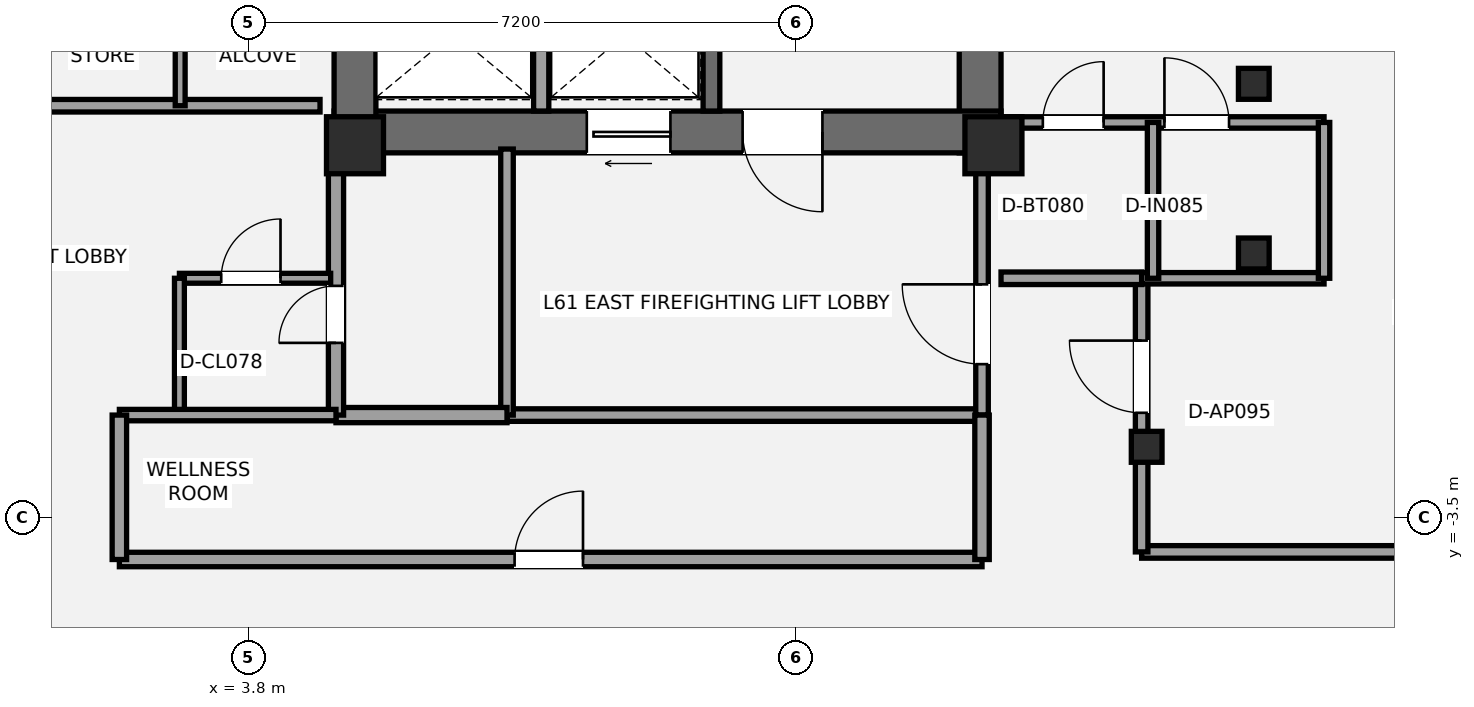
"""IFC4 building model, lengths in metres.
Left out: names, types, materials, properties, quantities, classifications, styles, units other than length and angle.
Written with IfcOpenShell. Run it as: python <this file> out.ifc"""

import sys

from ifc_helpers import new_model, si_unit, direction, frame, frame_2d, origin, origin_2d, place, context, subcontext, project, spatial, rectangle, i_section, extrude, element, fill, save


model = new_model("IFC4")
c1 = context("Model", 3, precision=1e-05, world=origin(), true_north=direction((0.0, 1.0)))
c2 = subcontext(c1, "Body", "Model", "MODEL_VIEW")
j1 = project(units=[si_unit("LENGTHUNIT", "METRE"), si_unit("PLANEANGLEUNIT", "RADIAN")], contexts=[c1])
p1 = place(None, origin())
s1 = spatial("IfcSite", under=j1, at=p1, CompositionType="ELEMENT")
p2 = place(p1, origin())
s2 = spatial("IfcBuilding", under=s1, at=p2, CompositionType="ELEMENT")
p3 = place(p2, frame((0.0, 0.0, 219.45)))
s3 = spatial("IfcBuildingStorey", under=s2, at=p3, CompositionType="ELEMENT", Elevation=219.45)
p4 = place(p3, frame((13.425, 1.3, 0.0), z_axis=(0.0, 0.0, 1.0), x_axis=(0.0, 1.0, 0.0)))
e1 = element("IfcWall", 1, at=p4, inside=s3, PredefinedType="SHEAR", context=c2, shape_type="SweptSolid", body=[
    extrude(rectangle(XDim=8.25, YDim=0.55, at=frame_2d((4.125, 0.0))), origin(), (0.0, 0.0, 1.0), 3.15),
])
p5 = place(p3, frame((13.7, 1.575, 0.0), z_axis=(0.0, 0.0, 1.0), x_axis=(-1.0, 0.0, 0.0)))
e2 = element("IfcWall", 2, at=p5, inside=s3, PredefinedType="SHEAR", context=c2, shape_type="SweptSolid", body=[
    extrude(rectangle(XDim=8.775, YDim=0.55, at=frame_2d((4.387, 0.0))), origin(), (0.0, 0.0, 1.0), 3.15),
])
p6 = place(p5, frame((2.35, 0.0, 0.0)))
e3 = element("IfcOpeningElement", 3, at=p6, cuts=e2, PredefinedType="OPENING", context=c2, shape_type="SweptSolid", body=[
    extrude(rectangle(XDim=1.05, YDim=2.15, at=frame_2d((0.525, 1.075))), frame((0.0, 0.285, 0.0), z_axis=(0.0, -1.0, 0.0), x_axis=(1.0, 0.0, 0.0)), (0.0, 0.0, 1.0), 0.57),
])
p7 = place(p5, frame((4.35, 0.0, 0.0)))
e4 = element("IfcOpeningElement", 4, at=p7, cuts=e2, PredefinedType="OPENING", context=c2, shape_type="SweptSolid", body=[
    extrude(rectangle(XDim=1.1, YDim=2.2, at=frame_2d((0.55, 1.1))), frame((0.0, 0.285, 0.0), z_axis=(0.0, -1.0, 0.0), x_axis=(1.0, 0.0, 0.0)), (0.0, 0.0, 1.0), 0.57),
])
p8 = place(p3, frame((5.2, 1.3, 0.0), z_axis=(0.0, 0.0, 1.0), x_axis=(0.0, 1.0, 0.0)))
e5 = element("IfcWall", 5, at=p8, inside=s3, PredefinedType="SHEAR", context=c2, shape_type="SweptSolid", body=[
    extrude(rectangle(XDim=2.5, YDim=0.55, at=frame_2d((1.25, 0.0))), origin(), (0.0, 0.0, 1.0), 3.15),
])
p9 = place(p3, frame((9.89, 1.85, 0.0), z_axis=(0.0, 0.0, 1.0), x_axis=(0.0, 1.0, 0.0)))
e6 = element("IfcWall", 6, at=p9, inside=s3, PredefinedType="SHEAR", context=c2, shape_type="SweptSolid", body=[
    extrude(rectangle(XDim=7.15, YDim=0.22, at=frame_2d((3.575, 0.0))), origin(), (0.0, 0.0, 1.0), 3.15),
])
for number, where, z_axis, x_axis in (
    (7, (5.2, 1.4, 0.0), (0.0, 0.0, 1.0), (1.0, 0.0, 0.0)),
    (8, (13.6, 1.4, 0.0), (0.0, 0.0, 1.0), (1.0, 0.0, 0.0)),
):
    element("IfcColumn", number, at=place(p3, frame(where, z_axis=z_axis, x_axis=x_axis)), inside=s3, PredefinedType="PILASTER", context=c2, shape_type="SweptSolid", body=[
        extrude(rectangle(XDim=0.75, YDim=0.75, at=origin_2d()), origin(), (0.0, 0.0, 1.0), 3.15),
    ])
for number, where, z_axis, x_axis in (
    (9, (17.026, 2.208, 0.0), (0.0, 0.0, 1.0), (1.0, 0.0, 0.0)),
    (10, (15.616, -2.567, 0.0), (0.0, 0.0, 1.0), (1.0, 0.0, 0.0)),
    (11, (17.026, -0.024, 0.0), (0.0, 0.0, 1.0), (1.0, 0.0, 0.0)),
):
    element("IfcColumn", number, at=place(p3, frame(where, z_axis=z_axis, x_axis=x_axis)), inside=s3, PredefinedType="COLUMN", context=c2, shape_type="SweptSolid", body=[
        extrude(i_section(OverallWidth=0.404, OverallDepth=0.407, WebThickness=0.027, FlangeThickness=0.044, at=origin_2d()), origin(), (0.0, 0.0, 1.0), 3.15),
    ])
p10 = place(p3, frame((7.2, -2.15, 0.0), z_axis=(0.0, 0.0, 1.0), x_axis=(1.0, 0.0, 0.0)))
e12 = element("IfcWall", 12, at=p10, inside=s3, PredefinedType="PARTITIONING", context=c2, shape_type="SweptSolid", body=[
    extrude(rectangle(XDim=6.25, YDim=0.165, at=frame_2d((3.125, 0.0))), origin(), (0.0, 0.0, 1.0), 2.97),
])
p11 = place(p3, frame((7.2, -2.15, 0.0), z_axis=(0.0, 0.0, 1.0), x_axis=(0.0, 1.0, 0.0)))
e13 = element("IfcWall", 13, at=p11, inside=s3, PredefinedType="PARTITIONING", context=c2, shape_type="SweptSolid", body=[
    extrude(rectangle(XDim=3.5, YDim=0.165, at=frame_2d((1.75, 0.0))), origin(), (0.0, 0.0, 1.0), 2.423),
])
p12 = place(p3, frame((13.45, -2.15, 0.0), z_axis=(0.0, 0.0, 1.0), x_axis=(0.0, 1.0, 0.0)))
e14 = element("IfcWall", 14, at=p12, inside=s3, PredefinedType="PARTITIONING", context=c2, shape_type="SweptSolid", body=[
    extrude(rectangle(XDim=3.5, YDim=0.165, at=frame_2d((1.75, 0.0))), origin(), (0.0, 0.0, 1.0), 2.423),
])
p13 = place(p12, frame((0.67, 0.0, 0.0)))
e15 = element("IfcOpeningElement", 15, at=p13, cuts=e14, PredefinedType="OPENING", context=c2, shape_type="SweptSolid", body=[
    extrude(rectangle(XDim=1.05, YDim=2.15, at=frame_2d((0.525, 1.075))), frame((0.0, 0.093, 0.0), z_axis=(0.0, -1.0, 0.0), x_axis=(1.0, 0.0, 0.0)), (0.0, 0.0, 1.0), 0.185),
])
p14 = place(p3, frame((4.95, -2.15, 0.0), z_axis=(0.0, 0.0, 1.0), x_axis=(1.0, 0.0, 0.0)))
e16 = element("IfcWall", 16, at=p14, inside=s3, PredefinedType="SOLIDWALL", context=c2, shape_type="SweptSolid", body=[
    extrude(rectangle(XDim=2.25, YDim=0.2, at=frame_2d((1.125, 0.0))), origin(), (0.0, 0.0, 1.0), 2.97),
])
p15 = place(p3, frame((4.95, -2.15, 0.0), z_axis=(0.0, 0.0, 1.0), x_axis=(0.0, 1.0, 0.0)))
e17 = element("IfcWall", 17, at=p15, inside=s3, PredefinedType="SOLIDWALL", context=c2, shape_type="SweptSolid", body=[
    extrude(rectangle(XDim=3.5, YDim=0.2, at=frame_2d((1.75, 0.0))), origin(), (0.0, 0.0, 1.0), 2.423),
])
p16 = place(p15, frame((0.95, 0.0, 0.0)))
e18 = element("IfcOpeningElement", 18, at=p16, cuts=e17, PredefinedType="OPENING", context=c2, shape_type="SweptSolid", body=[
    extrude(rectangle(XDim=0.75, YDim=2.1, at=frame_2d((0.375, 1.05))), frame((0.0, 0.11, 0.0), z_axis=(0.0, -1.0, 0.0), x_axis=(1.0, 0.0, 0.0)), (0.0, 0.0, 1.0), 0.22),
])
p17 = place(p3, frame((2.89, -0.35, 0.0), z_axis=(0.0, 0.0, 1.0), x_axis=(1.0, 0.0, 0.0)))
e19 = element("IfcWall", 19, at=p17, inside=s3, PredefinedType="PARTITIONING", context=c2, shape_type="SweptSolid", body=[
    extrude(rectangle(XDim=1.99, YDim=0.13, at=frame_2d((0.995, 0.0))), origin(), (0.0, 0.0, 1.0), 2.97),
])
p18 = place(p17, frame((0.55, 0.0, 0.0)))
e20 = element("IfcOpeningElement", 20, at=p18, cuts=e19, PredefinedType="OPENING", context=c2, shape_type="SweptSolid", body=[
    extrude(rectangle(XDim=0.78, YDim=2.1, at=frame_2d((0.39, 1.05))), frame((0.0, 0.075, 0.0), z_axis=(0.0, -1.0, 0.0), x_axis=(1.0, 0.0, 0.0)), (0.0, 0.0, 1.0), 0.15),
])
p19 = place(p3, frame((2.89, -2.15, 0.0), z_axis=(0.0, 0.0, 1.0), x_axis=(0.0, 1.0, 0.0)))
e21 = element("IfcWall", 21, at=p19, inside=s3, PredefinedType="PARTITIONING", context=c2, shape_type="SweptSolid", body=[
    extrude(rectangle(XDim=1.8, YDim=0.13, at=frame_2d((0.9, 0.0))), origin(), (0.0, 0.0, 1.0), 2.97),
])
p20 = place(p3, frame((7.65, 1.85, 0.0), z_axis=(0.0, 0.0, 1.0), x_axis=(0.0, 1.0, 0.0)))
e22 = element("IfcWall", 22, at=p20, inside=s3, PredefinedType="SOLIDWALL", context=c2, shape_type="SweptSolid", body=[
    extrude(rectangle(XDim=1.97, YDim=0.2, at=frame_2d((0.985, 0.0))), origin(), (0.0, 0.0, 1.0), 2.97),
])
p21 = place(p3, frame((0.85, 1.92, 0.0), z_axis=(0.0, 0.0, 1.0), x_axis=(1.0, 0.0, 0.0)))
e23 = element("IfcWall", 23, at=p21, inside=s3, PredefinedType="PARTITIONING", context=c2, shape_type="SweptSolid", body=[
    extrude(rectangle(XDim=3.89, YDim=0.165, at=frame_2d((1.945, 0.0))), origin(), (0.0, 0.0, 1.0), 2.11),
])
p22 = place(p3, frame((2.9, 1.92, 0.0), z_axis=(0.0, 0.0, 1.0), x_axis=(0.0, 1.0, 0.0)))
e24 = element("IfcWall", 24, at=p22, inside=s3, PredefinedType="PARTITIONING", context=c2, shape_type="SweptSolid", body=[
    extrude(rectangle(XDim=1.82, YDim=0.13, at=frame_2d((0.91, 0.0))), origin(), (0.0, 0.0, 1.0), 2.97),
])
p23 = place(p3, frame((2.1, -4.05, 0.0), z_axis=(0.0, 0.0, 1.0), x_axis=(1.0, 0.0, 0.0)))
e25 = element("IfcWall", 25, at=p23, inside=s3, PredefinedType="PLUMBINGWALL", context=c2, shape_type="SweptSolid", body=[
    extrude(rectangle(XDim=11.35, YDim=0.19, at=frame_2d((5.675, 0.0))), origin(), (0.0, 0.0, 1.0), 2.357),
])
p24 = place(p23, frame((5.2, 0.0, 0.0)))
e26 = element("IfcOpeningElement", 26, at=p24, cuts=e25, PredefinedType="OPENING", context=c2, shape_type="SweptSolid", body=[
    extrude(rectangle(XDim=0.9, YDim=2.1, at=frame_2d((0.45, 1.05))), frame((0.0, 0.105, 0.0), z_axis=(0.0, -1.0, 0.0), x_axis=(1.0, 0.0, 0.0)), (0.0, 0.0, 1.0), 0.21),
])
p25 = place(p3, frame((2.1, -2.15, 0.0), z_axis=(0.0, 0.0, 1.0), x_axis=(1.0, 0.0, 0.0)))
e27 = element("IfcWall", 27, at=p25, inside=s3, PredefinedType="PLUMBINGWALL", context=c2, shape_type="SweptSolid", body=[
    extrude(rectangle(XDim=2.85, YDim=0.15, at=frame_2d((1.425, 0.0))), origin(), (0.0, 0.0, 1.0), 2.97),
])
p26 = place(p3, frame((2.1, -4.05, 0.0), z_axis=(0.0, 0.0, 1.0), x_axis=(0.0, 1.0, 0.0)))
e28 = element("IfcWall", 28, at=p26, inside=s3, PredefinedType="PLUMBINGWALL", context=c2, shape_type="SweptSolid", body=[
    extrude(rectangle(XDim=1.9, YDim=0.19, at=frame_2d((0.95, 0.0))), origin(), (0.0, 0.0, 1.0), 2.97),
])
p27 = place(p3, frame((13.45, -4.05, 0.0), z_axis=(0.0, 0.0, 1.0), x_axis=(0.0, 1.0, 0.0)))
e29 = element("IfcWall", 29, at=p27, inside=s3, PredefinedType="PLUMBINGWALL", context=c2, shape_type="SweptSolid", body=[
    extrude(rectangle(XDim=1.9, YDim=0.19, at=frame_2d((0.95, 0.0))), origin(), (0.0, 0.0, 1.0), 2.423),
])
p28 = place(p3, frame((15.55, -3.95, 0.0), z_axis=(0.0, 0.0, 1.0), x_axis=(1.0, 0.0, 0.0)))
e30 = element("IfcWall", 30, at=p28, inside=s3, PredefinedType="PARTITIONING", context=c2, shape_type="SweptSolid", body=[
    extrude(rectangle(XDim=6.166, YDim=0.165, at=frame_2d((3.083, 0.0))), origin(), (0.0, 0.0, 1.0), 2.423),
])
p29 = place(p3, frame((15.55, -3.95, 0.0), z_axis=(0.0, 0.0, 1.0), x_axis=(0.0, 1.0, 0.0)))
e31 = element("IfcWall", 31, at=p29, inside=s3, PredefinedType="PARTITIONING", context=c2, shape_type="SweptSolid", body=[
    extrude(rectangle(XDim=3.6, YDim=0.165, at=frame_2d((1.8, 0.0))), origin(), (0.0, 0.0, 1.0), 2.357),
])
p30 = place(p29, frame((1.83, 0.0, 0.0)))
e32 = element("IfcOpeningElement", 32, at=p30, cuts=e31, PredefinedType="OPENING", context=c2, shape_type="SweptSolid", body=[
    extrude(rectangle(XDim=0.95, YDim=2.15, at=frame_2d((0.475, 1.075))), frame((0.0, 0.093, 0.0), z_axis=(0.0, -1.0, 0.0), x_axis=(1.0, 0.0, 0.0)), (0.0, 0.0, 1.0), 0.185),
])
p31 = place(p3, frame((13.7, -0.35, 0.0), z_axis=(0.0, 0.0, 1.0), x_axis=(1.0, 0.0, 0.0)))
e33 = element("IfcWall", 33, at=p31, inside=s3, PredefinedType="PARTITIONING", context=c2, shape_type="SweptSolid", body=[
    extrude(rectangle(XDim=1.85, YDim=0.165, at=frame_2d((0.925, 0.0))), origin(), (0.0, 0.0, 1.0), 2.423),
])
p32 = place(p3, frame((13.7, 1.7, 0.0), z_axis=(0.0, 0.0, 1.0), x_axis=(1.0, 0.0, 0.0)))
e34 = element("IfcWall", 34, at=p32, inside=s3, PredefinedType="PLUMBINGWALL", context=c2, shape_type="SweptSolid", body=[
    extrude(rectangle(XDim=4.25, YDim=0.15, at=frame_2d((2.125, 0.0))), origin(), (0.0, 0.0, 1.0), 2.423),
])
p33 = place(p32, frame((0.55, 0.0, 0.0)))
e35 = element("IfcOpeningElement", 35, at=p33, cuts=e34, PredefinedType="OPENING", context=c2, shape_type="SweptSolid", body=[
    extrude(rectangle(XDim=0.8, YDim=2.1, at=frame_2d((0.4, 1.05))), frame((0.0, 0.085, 0.0), z_axis=(0.0, -1.0, 0.0), x_axis=(1.0, 0.0, 0.0)), (0.0, 0.0, 1.0), 0.17),
])
p34 = place(p32, frame((2.15, 0.0, 0.0)))
e36 = element("IfcOpeningElement", 36, at=p34, cuts=e34, PredefinedType="OPENING", context=c2, shape_type="SweptSolid", body=[
    extrude(rectangle(XDim=0.85, YDim=2.1, at=frame_2d((0.425, 1.05))), frame((0.0, 0.085, 0.0), z_axis=(0.0, -1.0, 0.0), x_axis=(1.0, 0.0, 0.0)), (0.0, 0.0, 1.0), 0.17),
])
p35 = place(p3, frame((15.55, -0.35, 0.0), z_axis=(0.0, 0.0, 1.0), x_axis=(1.0, 0.0, 0.0)))
e37 = element("IfcWall", 37, at=p35, inside=s3, PredefinedType="PLUMBINGWALL", context=c2, shape_type="SweptSolid", body=[
    extrude(rectangle(XDim=2.4, YDim=0.15, at=frame_2d((1.2, 0.0))), origin(), (0.0, 0.0, 1.0), 2.423),
])
p36 = place(p3, frame((15.7, -0.35, 0.0), z_axis=(0.0, 0.0, 1.0), x_axis=(0.0, 1.0, 0.0)))
e38 = element("IfcWall", 38, at=p36, inside=s3, PredefinedType="PLUMBINGWALL", context=c2, shape_type="SweptSolid", body=[
    extrude(rectangle(XDim=2.05, YDim=0.15, at=frame_2d((1.025, 0.0))), origin(), (0.0, 0.0, 1.0), 2.97),
])
p37 = place(p3, frame((17.95, -0.35, 0.0), z_axis=(0.0, 0.0, 1.0), x_axis=(0.0, 1.0, 0.0)))
e39 = element("IfcWall", 39, at=p37, inside=s3, PredefinedType="PLUMBINGWALL", context=c2, shape_type="SweptSolid", body=[
    extrude(rectangle(XDim=2.05, YDim=0.15, at=frame_2d((1.025, 0.0))), origin(), (0.0, 0.0, 1.0), 2.423),
])
p38 = place(p6, origin())
e40 = element("IfcDoor", 40, at=p38, inside=s3, OperationType="SINGLE_SWING_LEFT", PredefinedType="DOOR", context=c2, shape_type="SweptSolid", body=[
    extrude(rectangle(XDim=1.05, YDim=2.15, at=frame_2d((0.525, 1.075))), frame((0.0, 0.025, 0.0), z_axis=(0.0, -1.0, 0.0), x_axis=(1.0, 0.0, 0.0)), (0.0, 0.0, 1.0), 0.05),
])
fill(e3, e40)
p39 = place(p13, origin())
e41 = element("IfcDoor", 41, at=p39, inside=s3, OperationType="SINGLE_SWING_RIGHT", PredefinedType="DOOR", context=c2, shape_type="SweptSolid", body=[
    extrude(rectangle(XDim=1.05, YDim=2.15, at=frame_2d((0.525, 1.075))), frame((0.0, 0.025, 0.0), z_axis=(0.0, -1.0, 0.0), x_axis=(1.0, 0.0, 0.0)), (0.0, 0.0, 1.0), 0.05),
])
fill(e15, e41)
p40 = place(p16, origin())
e42 = element("IfcDoor", 42, at=p40, inside=s3, OperationType="SINGLE_SWING_LEFT", PredefinedType="DOOR", context=c2, shape_type="SweptSolid", body=[
    extrude(rectangle(XDim=0.75, YDim=2.1, at=frame_2d((0.375, 1.05))), frame((0.0, 0.025, 0.0), z_axis=(0.0, -1.0, 0.0), x_axis=(1.0, 0.0, 0.0)), (0.0, 0.0, 1.0), 0.05),
])
fill(e18, e42)
p41 = place(p18, origin())
e43 = element("IfcDoor", 43, at=p41, inside=s3, OperationType="SINGLE_SWING_RIGHT", PredefinedType="DOOR", context=c2, shape_type="SweptSolid", body=[
    extrude(rectangle(XDim=0.78, YDim=2.1, at=frame_2d((0.39, 1.05))), frame((0.0, 0.025, 0.0), z_axis=(0.0, -1.0, 0.0), x_axis=(1.0, 0.0, 0.0)), (0.0, 0.0, 1.0), 0.05),
])
fill(e20, e43)
p42 = place(p7, origin())
e44 = element("IfcDoor", 44, at=p42, inside=s3, OperationType="SLIDING_TO_LEFT", PredefinedType="DOOR", context=c2, shape_type="SweptSolid", body=[
    extrude(rectangle(XDim=1.1, YDim=2.2, at=frame_2d((0.55, 1.1))), frame((0.0, 0.025, 0.0), z_axis=(0.0, -1.0, 0.0), x_axis=(1.0, 0.0, 0.0)), (0.0, 0.0, 1.0), 0.05),
])
fill(e4, e44)
p43 = place(p24, origin())
e45 = element("IfcDoor", 45, at=p43, inside=s3, OperationType="SINGLE_SWING_RIGHT", PredefinedType="DOOR", context=c2, shape_type="SweptSolid", body=[
    extrude(rectangle(XDim=0.9, YDim=2.1, at=frame_2d((0.45, 1.05))), frame((0.0, 0.025, 0.0), z_axis=(0.0, -1.0, 0.0), x_axis=(1.0, 0.0, 0.0)), (0.0, 0.0, 1.0), 0.05),
])
fill(e26, e45)
p44 = place(p30, origin())
e46 = element("IfcDoor", 46, at=p44, inside=s3, OperationType="SINGLE_SWING_RIGHT", PredefinedType="DOOR", context=c2, shape_type="SweptSolid", body=[
    extrude(rectangle(XDim=0.95, YDim=2.15, at=frame_2d((0.475, 1.075))), frame((0.0, 0.025, 0.0), z_axis=(0.0, -1.0, 0.0), x_axis=(1.0, 0.0, 0.0)), (0.0, 0.0, 1.0), 0.05),
])
fill(e32, e46)
p45 = place(p33, origin())
e47 = element("IfcDoor", 47, at=p45, inside=s3, OperationType="SINGLE_SWING_RIGHT", PredefinedType="DOOR", context=c2, shape_type="SweptSolid", body=[
    extrude(rectangle(XDim=0.8, YDim=2.1, at=frame_2d((0.4, 1.05))), frame((0.0, 0.025, 0.0), z_axis=(0.0, -1.0, 0.0), x_axis=(1.0, 0.0, 0.0)), (0.0, 0.0, 1.0), 0.05),
])
fill(e35, e47)
p46 = place(p34, origin())
e48 = element("IfcDoor", 48, at=p46, inside=s3, OperationType="SINGLE_SWING_LEFT", PredefinedType="DOOR", context=c2, shape_type="SweptSolid", body=[
    extrude(rectangle(XDim=0.85, YDim=2.1, at=frame_2d((0.425, 1.05))), frame((0.0, 0.025, 0.0), z_axis=(0.0, -1.0, 0.0), x_axis=(1.0, 0.0, 0.0)), (0.0, 0.0, 1.0), 0.05),
])
fill(e36, e48)
save(model, sys.argv[1])
